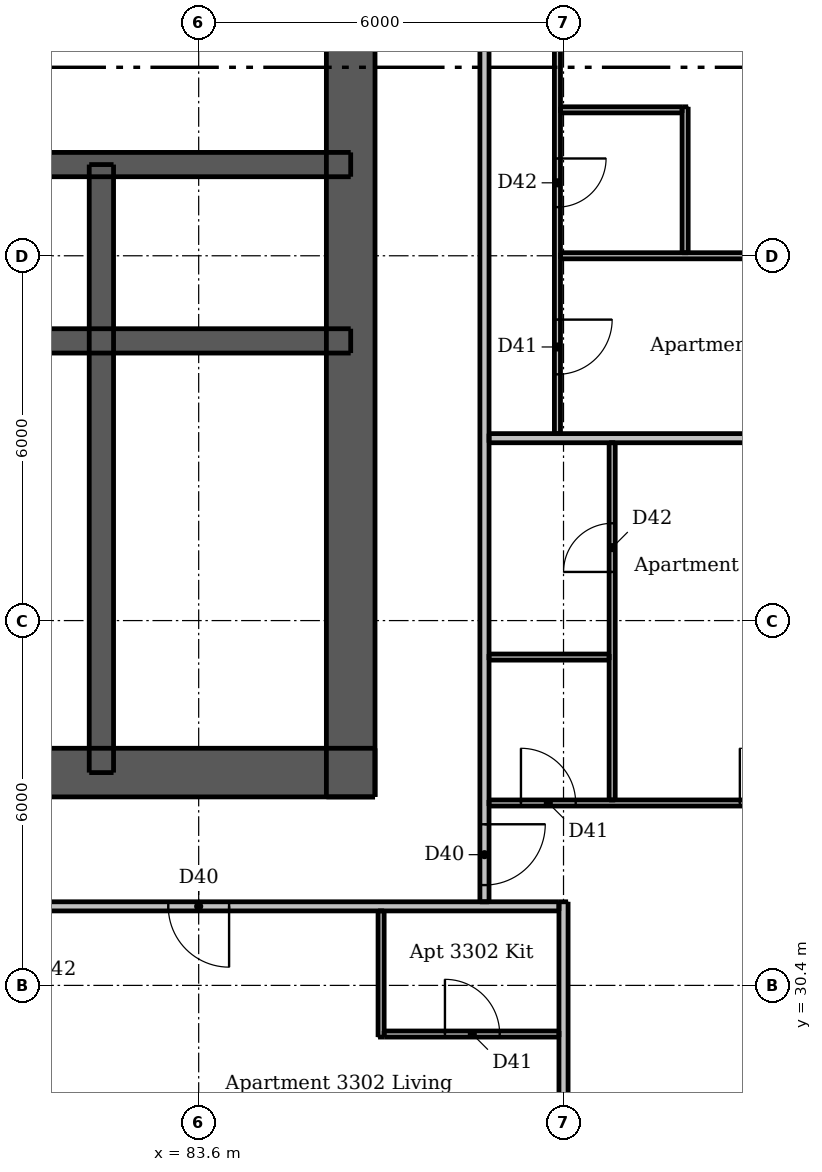
"""IFC4 building model, lengths in metres.
Left out: names, types, materials, properties, quantities, classifications, styles, units other than length and angle.
Written with IfcOpenShell. Run it as: python <this file> out.ifc"""

import sys

from ifc_helpers import new_model, si_unit, direction, frame, frame_2d, origin, place, context, subcontext, project, spatial, rectangle, extrude, element, fill, save


model = new_model("IFC4")
c1 = context("Model", 3, precision=1e-05, world=origin(), true_north=direction((0.0, 1.0)))
c2 = subcontext(c1, "Body", "Model", "MODEL_VIEW")
j1 = project(units=[si_unit("LENGTHUNIT", "METRE"), si_unit("PLANEANGLEUNIT", "RADIAN")], contexts=[c1])
p1 = place(None, origin())
s1 = spatial("IfcSite", under=j1, at=p1, CompositionType="ELEMENT")
p2 = place(p1, origin())
s2 = spatial("IfcBuilding", under=s1, at=p2, CompositionType="ELEMENT")
p3 = place(p2, frame((0.0, 0.0, 121.6)))
s3 = spatial("IfcBuildingStorey", under=s2, at=p3, CompositionType="ELEMENT", Elevation=121.6)
p4 = place(p3, frame((62.5, 33.9, 0.0), z_axis=(0.0, 0.0, 1.0), x_axis=(1.0, 0.0, 0.0)))
e1 = element("IfcWall", 1, at=p4, inside=s3, PredefinedType="SHEAR", context=c2, shape_type="SweptSolid", body=[
    extrude(rectangle(XDim=24.0, YDim=0.8, at=frame_2d((12.0, 0.0))), origin(), (0.0, 0.0, 1.0), 2.95),
])
p5 = place(p4, frame((2.0, 0.0, 0.0)))
e2 = element("IfcOpeningElement", 2, at=p5, cuts=e1, PredefinedType="OPENING", context=c2, shape_type="SweptSolid", body=[
    extrude(rectangle(XDim=1.1, YDim=2.1, at=frame_2d((0.55, 1.05))), frame((0.0, 0.41, 0.0), z_axis=(0.0, -1.0, 0.0), x_axis=(1.0, 0.0, 0.0)), (0.0, 0.0, 1.0), 0.82),
])
p6 = place(p4, frame((20.9, 0.0, 0.0)))
e3 = element("IfcOpeningElement", 3, at=p6, cuts=e1, PredefinedType="OPENING", context=c2, shape_type="SweptSolid", body=[
    extrude(rectangle(XDim=1.1, YDim=2.1, at=frame_2d((0.55, 1.05))), frame((0.0, 0.41, 0.0), z_axis=(0.0, -1.0, 0.0), x_axis=(1.0, 0.0, 0.0)), (0.0, 0.0, 1.0), 0.82),
])
p7 = place(p4, frame((8.0, 0.0, 0.0)))
e4 = element("IfcOpeningElement", 4, at=p7, cuts=e1, PredefinedType="OPENING", context=c2, shape_type="SweptSolid", body=[
    extrude(rectangle(XDim=1.1, YDim=2.1, at=frame_2d((0.55, 1.05))), frame((0.0, 0.41, 0.0), z_axis=(0.0, -1.0, 0.0), x_axis=(1.0, 0.0, 0.0)), (0.0, 0.0, 1.0), 0.82),
])
p8 = place(p4, frame((17.488, 0.0, 0.0)))
e5 = element("IfcOpeningElement", 5, at=p8, cuts=e1, PredefinedType="OPENING", context=c2, shape_type="SweptSolid", body=[
    extrude(rectangle(XDim=0.9, YDim=2.1, at=frame_2d((0.45, 1.05))), frame((0.0, 0.41, 0.0), z_axis=(0.0, -1.0, 0.0), x_axis=(1.0, 0.0, 0.0)), (0.0, 0.0, 1.0), 0.82),
])
p9 = place(p3, frame((86.1, 33.5, 0.0), z_axis=(0.0, 0.0, 1.0), x_axis=(0.0, 1.0, 0.0)))
e6 = element("IfcWall", 6, at=p9, inside=s3, PredefinedType="SHEAR", context=c2, shape_type="SweptSolid", body=[
    extrude(rectangle(XDim=24.0, YDim=0.8, at=frame_2d((12.0, 0.0))), origin(), (0.0, 0.0, 1.0), 2.95),
])
p10 = place(p9, frame((11.2, 0.0, 0.0)))
e7 = element("IfcOpeningElement", 7, at=p10, cuts=e6, PredefinedType="OPENING", context=c2, shape_type="SweptSolid", body=[
    extrude(rectangle(XDim=1.6, YDim=2.1, at=frame_2d((0.8, 1.05))), frame((0.0, 0.41, 0.0), z_axis=(0.0, -1.0, 0.0), x_axis=(1.0, 0.0, 0.0)), (0.0, 0.0, 1.0), 0.82),
])
p11 = place(p3, frame((62.9, 41.0, 0.0), z_axis=(0.0, 0.0, 1.0), x_axis=(1.0, 0.0, 0.0)))
e8 = element("IfcWall", 8, at=p11, inside=s3, PredefinedType="SHEAR", context=c2, shape_type="SweptSolid", body=[
    extrude(rectangle(XDim=23.2, YDim=0.4, at=frame_2d((11.6, 0.0))), origin(), (0.0, 0.0, 1.0), 2.95),
])
p12 = place(p3, frame((62.9, 43.9, 0.0), z_axis=(0.0, 0.0, 1.0), x_axis=(1.0, 0.0, 0.0)))
e9 = element("IfcWall", 9, at=p12, inside=s3, PredefinedType="SHEAR", context=c2, shape_type="SweptSolid", body=[
    extrude(rectangle(XDim=23.2, YDim=0.4, at=frame_2d((11.6, 0.0))), origin(), (0.0, 0.0, 1.0), 2.95),
])
p13 = place(p12, frame((1.7, 0.0, 0.0)))
e10 = element("IfcOpeningElement", 10, at=p13, cuts=e9, PredefinedType="OPENING", context=c2, shape_type="SweptSolid", body=[
    extrude(rectangle(XDim=0.9, YDim=2.1, at=frame_2d((0.45, 1.05))), frame((0.0, 0.21, 0.0), z_axis=(0.0, -1.0, 0.0), x_axis=(1.0, 0.0, 0.0)), (0.0, 0.0, 1.0), 0.42),
])
p14 = place(p12, frame((20.6, 0.0, 0.0)))
e11 = element("IfcOpeningElement", 11, at=p14, cuts=e9, PredefinedType="OPENING", context=c2, shape_type="SweptSolid", body=[
    extrude(rectangle(XDim=0.9, YDim=2.1, at=frame_2d((0.45, 1.05))), frame((0.0, 0.21, 0.0), z_axis=(0.0, -1.0, 0.0), x_axis=(1.0, 0.0, 0.0)), (0.0, 0.0, 1.0), 0.42),
])
p15 = place(p12, frame((4.8, 0.0, 0.0)))
e12 = element("IfcOpeningElement", 12, at=p15, cuts=e9, PredefinedType="OPENING", context=c2, shape_type="SweptSolid", body=[
    extrude(rectangle(XDim=1.1, YDim=2.1, at=frame_2d((0.55, 1.05))), frame((0.0, 0.21, 0.0), z_axis=(0.0, -1.0, 0.0), x_axis=(1.0, 0.0, 0.0)), (0.0, 0.0, 1.0), 0.42),
])
p16 = place(p12, frame((7.3, 0.0, 0.0)))
e13 = element("IfcOpeningElement", 13, at=p16, cuts=e9, PredefinedType="OPENING", context=c2, shape_type="SweptSolid", body=[
    extrude(rectangle(XDim=1.1, YDim=2.1, at=frame_2d((0.55, 1.05))), frame((0.0, 0.21, 0.0), z_axis=(0.0, -1.0, 0.0), x_axis=(1.0, 0.0, 0.0)), (0.0, 0.0, 1.0), 0.42),
])
p17 = place(p12, frame((9.8, 0.0, 0.0)))
e14 = element("IfcOpeningElement", 14, at=p17, cuts=e9, PredefinedType="OPENING", context=c2, shape_type="SweptSolid", body=[
    extrude(rectangle(XDim=1.1, YDim=2.1, at=frame_2d((0.55, 1.05))), frame((0.0, 0.21, 0.0), z_axis=(0.0, -1.0, 0.0), x_axis=(1.0, 0.0, 0.0)), (0.0, 0.0, 1.0), 0.42),
])
p18 = place(p12, frame((12.3, 0.0, 0.0)))
e15 = element("IfcOpeningElement", 15, at=p18, cuts=e9, PredefinedType="OPENING", context=c2, shape_type="SweptSolid", body=[
    extrude(rectangle(XDim=1.1, YDim=2.1, at=frame_2d((0.55, 1.05))), frame((0.0, 0.21, 0.0), z_axis=(0.0, -1.0, 0.0), x_axis=(1.0, 0.0, 0.0)), (0.0, 0.0, 1.0), 0.42),
])
p19 = place(p12, frame((14.8, 0.0, 0.0)))
e16 = element("IfcOpeningElement", 16, at=p19, cuts=e9, PredefinedType="OPENING", context=c2, shape_type="SweptSolid", body=[
    extrude(rectangle(XDim=1.1, YDim=2.1, at=frame_2d((0.55, 1.05))), frame((0.0, 0.21, 0.0), z_axis=(0.0, -1.0, 0.0), x_axis=(1.0, 0.0, 0.0)), (0.0, 0.0, 1.0), 0.42),
])
p20 = place(p12, frame((17.3, 0.0, 0.0)))
e17 = element("IfcOpeningElement", 17, at=p20, cuts=e9, PredefinedType="OPENING", context=c2, shape_type="SweptSolid", body=[
    extrude(rectangle(XDim=1.1, YDim=2.1, at=frame_2d((0.55, 1.05))), frame((0.0, 0.21, 0.0), z_axis=(0.0, -1.0, 0.0), x_axis=(1.0, 0.0, 0.0)), (0.0, 0.0, 1.0), 0.42),
])
p21 = place(p3, frame((82.0, 33.9, 0.0), z_axis=(0.0, 0.0, 1.0), x_axis=(0.0, 1.0, 0.0)))
e18 = element("IfcWall", 18, at=p21, inside=s3, PredefinedType="SHEAR", context=c2, shape_type="SweptSolid", body=[
    extrude(rectangle(XDim=10.0, YDim=0.4, at=frame_2d((5.0, 0.0))), origin(), (0.0, 0.0, 1.0), 2.95),
])
p22 = place(p3, frame((86.6, 29.55, 0.0), z_axis=(0.0, 0.0, 1.0), x_axis=(0.0, 1.0, 0.0)))
e19 = element("IfcWall", 19, at=p22, inside=s3, PredefinedType="PARTITIONING", context=c2, shape_type="SweptSolid", body=[
    extrude(rectangle(XDim=2.075, YDim=0.1, at=frame_2d((1.038, 0.0))), origin(), (0.0, 0.0, 1.0), 2.95),
])
p23 = place(p3, frame((89.5, 54.325, 0.0), z_axis=(0.0, 0.0, 1.0), x_axis=(0.0, -1.0, 0.0)))
e20 = element("IfcWall", 20, at=p23, inside=s3, PredefinedType="PARTITIONING", context=c2, shape_type="SweptSolid", body=[
    extrude(rectangle(XDim=14.85, YDim=0.1, at=frame_2d((7.425, 0.0))), origin(), (0.0, 0.0, 1.0), 2.95),
])
p24 = place(p23, frame((5.775, 0.0, 0.0)))
e21 = element("IfcOpeningElement", 21, at=p24, cuts=e20, PredefinedType="OPENING", context=c2, shape_type="SweptSolid", body=[
    extrude(rectangle(XDim=0.9, YDim=2.1, at=frame_2d((0.45, 1.05))), frame((0.0, 0.06, 0.0), z_axis=(0.0, -1.0, 0.0), x_axis=(1.0, 0.0, 0.0)), (0.0, 0.0, 1.0), 0.12),
])
p25 = place(p23, frame((0.975, 0.0, 0.0)))
e22 = element("IfcOpeningElement", 22, at=p25, cuts=e20, PredefinedType="OPENING", context=c2, shape_type="SweptSolid", body=[
    extrude(rectangle(XDim=0.9, YDim=2.1, at=frame_2d((0.45, 1.05))), frame((0.0, 0.06, 0.0), z_axis=(0.0, -1.0, 0.0), x_axis=(1.0, 0.0, 0.0)), (0.0, 0.0, 1.0), 0.12),
])
p26 = place(p23, frame((12.975, 0.0, 0.0)))
e23 = element("IfcOpeningElement", 23, at=p26, cuts=e20, PredefinedType="OPENING", context=c2, shape_type="SweptSolid", body=[
    extrude(rectangle(XDim=0.9, YDim=2.1, at=frame_2d((0.45, 1.05))), frame((0.0, 0.06, 0.0), z_axis=(0.0, -1.0, 0.0), x_axis=(1.0, 0.0, 0.0)), (0.0, 0.0, 1.0), 0.12),
])
p27 = place(p23, frame((10.325, 0.0, 0.0)))
e24 = element("IfcOpeningElement", 24, at=p27, cuts=e20, PredefinedType="OPENING", context=c2, shape_type="SweptSolid", body=[
    extrude(rectangle(XDim=0.8, YDim=2.1, at=frame_2d((0.4, 1.05))), frame((0.0, 0.06, 0.0), z_axis=(0.0, -1.0, 0.0), x_axis=(1.0, 0.0, 0.0)), (0.0, 0.0, 1.0), 0.12),
])
p28 = place(p3, frame((90.4, 33.45, 0.0), z_axis=(0.0, 0.0, 1.0), x_axis=(0.0, 1.0, 0.0)))
e25 = element("IfcWall", 25, at=p28, inside=s3, PredefinedType="PARTITIONING", context=c2, shape_type="SweptSolid", body=[
    extrude(rectangle(XDim=5.875, YDim=0.1, at=frame_2d((2.938, 0.0))), origin(), (0.0, 0.0, 1.0), 2.95),
])
p29 = place(p28, frame((3.75, 0.0, 0.0)))
e26 = element("IfcOpeningElement", 26, at=p29, cuts=e25, PredefinedType="OPENING", context=c2, shape_type="SweptSolid", body=[
    extrude(rectangle(XDim=0.8, YDim=2.1, at=frame_2d((0.4, 1.05))), frame((0.0, 0.06, 0.0), z_axis=(0.0, -1.0, 0.0), x_axis=(1.0, 0.0, 0.0)), (0.0, 0.0, 1.0), 0.12),
])
p30 = place(p3, frame((91.6, 42.45, 0.0), z_axis=(0.0, 0.0, 1.0), x_axis=(0.0, 1.0, 0.0)))
e27 = element("IfcWall", 27, at=p30, inside=s3, PredefinedType="PARTITIONING", context=c2, shape_type="SweptSolid", body=[
    extrude(rectangle(XDim=2.4, YDim=0.1, at=frame_2d((1.2, 0.0))), origin(), (0.0, 0.0, 1.0), 2.95),
])
p31 = place(p3, frame((89.55, 44.8, 0.0), z_axis=(0.0, 0.0, 1.0), x_axis=(1.0, 0.0, 0.0)))
e28 = element("IfcWall", 28, at=p31, inside=s3, PredefinedType="PARTITIONING", context=c2, shape_type="SweptSolid", body=[
    extrude(rectangle(XDim=2.0, YDim=0.1, at=frame_2d((1.0, 0.0))), origin(), (0.0, 0.0, 1.0), 2.95),
])
p32 = place(p3, frame((89.55, 42.4, 0.0), z_axis=(0.0, 0.0, 1.0), x_axis=(1.0, 0.0, 0.0)))
e29 = element("IfcWall", 29, at=p32, inside=s3, PredefinedType="PARTITIONING", context=c2, shape_type="SweptSolid", body=[
    extrude(rectangle(XDim=7.45, YDim=0.1, at=frame_2d((3.725, 0.0))), origin(), (0.0, 0.0, 1.0), 2.332),
])
p33 = place(p3, frame((88.375, 35.8, 0.0), z_axis=(0.0, 0.0, 1.0), x_axis=(1.0, 0.0, 0.0)))
e30 = element("IfcWall", 30, at=p33, inside=s3, PredefinedType="PARTITIONING", context=c2, shape_type="SweptSolid", body=[
    extrude(rectangle(XDim=1.975, YDim=0.1, at=frame_2d((0.988, 0.0))), origin(), (0.0, 0.0, 1.0), 2.95),
])
p34 = place(p3, frame((88.375, 33.4, 0.0), z_axis=(0.0, 0.0, 1.0), x_axis=(1.0, 0.0, 0.0)))
e31 = element("IfcWall", 31, at=p34, inside=s3, PredefinedType="PARTITIONING", context=c2, shape_type="SweptSolid", body=[
    extrude(rectangle(XDim=7.125, YDim=0.1, at=frame_2d((3.562, 0.0))), origin(), (0.0, 0.0, 1.0), 2.95),
])
p35 = place(p34, frame((0.525, 0.0, 0.0)))
e32 = element("IfcOpeningElement", 32, at=p35, cuts=e31, PredefinedType="OPENING", context=c2, shape_type="SweptSolid", body=[
    extrude(rectangle(XDim=0.9, YDim=2.1, at=frame_2d((0.45, 1.05))), frame((0.0, 0.06, 0.0), z_axis=(0.0, -1.0, 0.0), x_axis=(1.0, 0.0, 0.0)), (0.0, 0.0, 1.0), 0.12),
])
p36 = place(p34, frame((4.125, 0.0, 0.0)))
e33 = element("IfcOpeningElement", 33, at=p36, cuts=e31, PredefinedType="OPENING", context=c2, shape_type="SweptSolid", body=[
    extrude(rectangle(XDim=0.9, YDim=2.1, at=frame_2d((0.45, 1.05))), frame((0.0, 0.06, 0.0), z_axis=(0.0, -1.0, 0.0), x_axis=(1.0, 0.0, 0.0)), (0.0, 0.0, 1.0), 0.12),
])
p37 = place(p3, frame((86.65, 29.6, 0.0), z_axis=(0.0, 0.0, 1.0), x_axis=(1.0, 0.0, 0.0)))
e34 = element("IfcWall", 34, at=p37, inside=s3, PredefinedType="PARTITIONING", context=c2, shape_type="SweptSolid", body=[
    extrude(rectangle(XDim=2.875, YDim=0.1, at=frame_2d((1.438, 0.0))), origin(), (0.0, 0.0, 1.0), 2.95),
])
p38 = place(p37, frame((1.0, 0.0, 0.0)))
e35 = element("IfcOpeningElement", 35, at=p38, cuts=e34, PredefinedType="OPENING", context=c2, shape_type="SweptSolid", body=[
    extrude(rectangle(XDim=0.9, YDim=2.1, at=frame_2d((0.45, 1.05))), frame((0.0, 0.06, 0.0), z_axis=(0.0, -1.0, 0.0), x_axis=(1.0, 0.0, 0.0)), (0.0, 0.0, 1.0), 0.12),
])
p39 = place(p3, frame((88.3, 60.475, 0.0), z_axis=(0.0, 0.0, 1.0), x_axis=(0.0, -1.0, 0.0)))
e36 = element("IfcWall", 36, at=p39, inside=s3, PredefinedType="PARTITIONING", context=c2, shape_type="SweptSolid", body=[
    extrude(rectangle(XDim=28.7, YDim=0.15, at=frame_2d((14.35, 0.0))), origin(), (0.0, 0.0, 1.0), 2.95),
])
p40 = place(p39, frame((27.425, 0.0, 0.0)))
e37 = element("IfcOpeningElement", 37, at=p40, cuts=e36, PredefinedType="OPENING", context=c2, shape_type="SweptSolid", body=[
    extrude(rectangle(XDim=1.0, YDim=2.1, at=frame_2d((0.5, 1.05))), frame((0.0, 0.085, 0.0), z_axis=(0.0, -1.0, 0.0), x_axis=(1.0, 0.0, 0.0)), (0.0, 0.0, 1.0), 0.17),
])
p41 = place(p39, frame((13.075, 0.0, 0.0)))
e38 = element("IfcOpeningElement", 38, at=p41, cuts=e36, PredefinedType="OPENING", context=c2, shape_type="SweptSolid", body=[
    extrude(rectangle(XDim=1.0, YDim=2.1, at=frame_2d((0.5, 1.05))), frame((0.0, 0.085, 0.0), z_axis=(0.0, -1.0, 0.0), x_axis=(1.0, 0.0, 0.0)), (0.0, 0.0, 1.0), 0.17),
])
p42 = place(p39, frame((2.575, 0.0, 0.0)))
e39 = element("IfcOpeningElement", 39, at=p42, cuts=e36, PredefinedType="OPENING", context=c2, shape_type="SweptSolid", body=[
    extrude(rectangle(XDim=1.0, YDim=2.1, at=frame_2d((0.5, 1.05))), frame((0.0, 0.085, 0.0), z_axis=(0.0, -1.0, 0.0), x_axis=(1.0, 0.0, 0.0)), (0.0, 0.0, 1.0), 0.17),
])
p43 = place(p3, frame((89.6, 26.0, 0.0), z_axis=(0.0, 0.0, 1.0), x_axis=(0.0, 1.0, 0.0)))
e40 = element("IfcWall", 40, at=p43, inside=s3, PredefinedType="PARTITIONING", context=c2, shape_type="SweptSolid", body=[
    extrude(rectangle(XDim=5.775, YDim=0.15, at=frame_2d((2.887, 0.0))), origin(), (0.0, 0.0, 1.0), 2.332),
])
p44 = place(p3, frame((88.375, 39.4, 0.0), z_axis=(0.0, 0.0, 1.0), x_axis=(1.0, 0.0, 0.0)))
e41 = element("IfcWall", 41, at=p44, inside=s3, PredefinedType="PARTITIONING", context=c2, shape_type="SweptSolid", body=[
    extrude(rectangle(XDim=8.625, YDim=0.15, at=frame_2d((4.312, 0.0))), origin(), (0.0, 0.0, 1.0), 2.95),
])
p45 = place(p3, frame((89.525, 31.7, 0.0), z_axis=(0.0, 0.0, 1.0), x_axis=(-1.0, 0.0, 0.0)))
e42 = element("IfcWall", 42, at=p45, inside=s3, PredefinedType="PARTITIONING", context=c2, shape_type="SweptSolid", body=[
    extrude(rectangle(XDim=28.75, YDim=0.15, at=frame_2d((14.375, 0.0))), origin(), (0.0, 0.0, 1.0), 2.95),
])
p46 = place(p45, frame((24.625, 0.0, 0.0)))
e43 = element("IfcOpeningElement", 43, at=p46, cuts=e42, PredefinedType="OPENING", context=c2, shape_type="SweptSolid", body=[
    extrude(rectangle(XDim=1.0, YDim=2.1, at=frame_2d((0.5, 1.05))), frame((0.0, 0.085, 0.0), z_axis=(0.0, -1.0, 0.0), x_axis=(1.0, 0.0, 0.0)), (0.0, 0.0, 1.0), 0.17),
])
p47 = place(p45, frame((5.425, 0.0, 0.0)))
e44 = element("IfcOpeningElement", 44, at=p47, cuts=e42, PredefinedType="OPENING", context=c2, shape_type="SweptSolid", body=[
    extrude(rectangle(XDim=1.0, YDim=2.1, at=frame_2d((0.5, 1.05))), frame((0.0, 0.085, 0.0), z_axis=(0.0, -1.0, 0.0), x_axis=(1.0, 0.0, 0.0)), (0.0, 0.0, 1.0), 0.17),
])
p48 = place(p6, origin())
e45 = element("IfcDoor", 45, at=p48, inside=s3, OperationType="SINGLE_SWING_RIGHT", PredefinedType="DOOR", context=c2, shape_type="SweptSolid", body=[
    extrude(rectangle(XDim=1.1, YDim=2.1, at=frame_2d((0.55, 1.05))), frame((0.0, 0.388, 0.0), z_axis=(0.0, -1.0, 0.0), x_axis=(1.0, 0.0, 0.0)), (0.0, 0.0, 1.0), 0.05),
])
fill(e3, e45)
p49 = place(p10, origin())
e46 = element("IfcDoor", 46, at=p49, inside=s3, OperationType="DOUBLE_DOOR_SINGLE_SWING", PredefinedType="DOOR", context=c2, shape_type="SweptSolid", body=[
    extrude(rectangle(XDim=1.6, YDim=2.1, at=frame_2d((0.8, 1.05))), frame((0.0, 0.388, 0.0), z_axis=(0.0, -1.0, 0.0), x_axis=(1.0, 0.0, 0.0)), (0.0, 0.0, 1.0), 0.05),
])
fill(e7, e46)
p50 = place(p14, origin())
e47 = element("IfcDoor", 47, at=p50, inside=s3, OperationType="SINGLE_SWING_LEFT", PredefinedType="DOOR", context=c2, shape_type="SweptSolid", body=[
    extrude(rectangle(XDim=0.9, YDim=2.1, at=frame_2d((0.45, 1.05))), frame((0.0, -0.138, 0.0), z_axis=(0.0, -1.0, 0.0), x_axis=(1.0, 0.0, 0.0)), (0.0, 0.0, 1.0), 0.05),
])
fill(e11, e47)
p51 = place(p20, origin())
e48 = element("IfcDoor", 48, at=p51, inside=s3, OperationType="DOUBLE_DOOR_SLIDING", PredefinedType="DOOR", context=c2, shape_type="SweptSolid", body=[
    extrude(rectangle(XDim=1.1, YDim=2.1, at=frame_2d((0.55, 1.05))), frame((0.0, 0.025, 0.0), z_axis=(0.0, -1.0, 0.0), x_axis=(1.0, 0.0, 0.0)), (0.0, 0.0, 1.0), 0.05),
])
fill(e17, e48)
p52 = place(p47, origin())
e49 = element("IfcDoor", 49, at=p52, inside=s3, OperationType="SINGLE_SWING_LEFT", PredefinedType="DOOR", context=c2, shape_type="SweptSolid", body=[
    extrude(rectangle(XDim=1.0, YDim=2.1, at=frame_2d((0.5, 1.05))), frame((0.0, 0.025, 0.0), z_axis=(0.0, -1.0, 0.0), x_axis=(1.0, 0.0, 0.0)), (0.0, 0.0, 1.0), 0.05),
])
fill(e44, e49)
p53 = place(p38, origin())
e50 = element("IfcDoor", 50, at=p53, inside=s3, OperationType="SINGLE_SWING_LEFT", PredefinedType="DOOR", context=c2, shape_type="SweptSolid", body=[
    extrude(rectangle(XDim=0.9, YDim=2.1, at=frame_2d((0.45, 1.05))), frame((0.0, 0.025, 0.0), z_axis=(0.0, -1.0, 0.0), x_axis=(1.0, 0.0, 0.0)), (0.0, 0.0, 1.0), 0.05),
])
fill(e35, e50)
p54 = place(p40, origin())
e51 = element("IfcDoor", 51, at=p54, inside=s3, OperationType="SINGLE_SWING_LEFT", PredefinedType="DOOR", context=c2, shape_type="SweptSolid", body=[
    extrude(rectangle(XDim=1.0, YDim=2.1, at=frame_2d((0.5, 1.05))), frame((0.0, 0.025, 0.0), z_axis=(0.0, -1.0, 0.0), x_axis=(1.0, 0.0, 0.0)), (0.0, 0.0, 1.0), 0.05),
])
fill(e37, e51)
p55 = place(p35, origin())
e52 = element("IfcDoor", 52, at=p55, inside=s3, OperationType="SINGLE_SWING_LEFT", PredefinedType="DOOR", context=c2, shape_type="SweptSolid", body=[
    extrude(rectangle(XDim=0.9, YDim=2.1, at=frame_2d((0.45, 1.05))), frame((0.0, 0.025, 0.0), z_axis=(0.0, -1.0, 0.0), x_axis=(1.0, 0.0, 0.0)), (0.0, 0.0, 1.0), 0.05),
])
fill(e32, e52)
p56 = place(p36, origin())
e53 = element("IfcDoor", 53, at=p56, inside=s3, OperationType="SINGLE_SWING_LEFT", PredefinedType="DOOR", context=c2, shape_type="SweptSolid", body=[
    extrude(rectangle(XDim=0.9, YDim=2.1, at=frame_2d((0.45, 1.05))), frame((0.0, 0.025, 0.0), z_axis=(0.0, -1.0, 0.0), x_axis=(1.0, 0.0, 0.0)), (0.0, 0.0, 1.0), 0.05),
])
fill(e33, e53)
p57 = place(p29, origin())
e54 = element("IfcDoor", 54, at=p57, inside=s3, OperationType="SINGLE_SWING_LEFT", PredefinedType="DOOR", context=c2, shape_type="SweptSolid", body=[
    extrude(rectangle(XDim=0.8, YDim=2.1, at=frame_2d((0.4, 1.05))), frame((0.0, 0.025, 0.0), z_axis=(0.0, -1.0, 0.0), x_axis=(1.0, 0.0, 0.0)), (0.0, 0.0, 1.0), 0.05),
])
fill(e26, e54)
p58 = place(p26, origin())
e55 = element("IfcDoor", 55, at=p58, inside=s3, OperationType="SINGLE_SWING_LEFT", PredefinedType="DOOR", context=c2, shape_type="SweptSolid", body=[
    extrude(rectangle(XDim=0.9, YDim=2.1, at=frame_2d((0.45, 1.05))), frame((0.0, 0.025, 0.0), z_axis=(0.0, -1.0, 0.0), x_axis=(1.0, 0.0, 0.0)), (0.0, 0.0, 1.0), 0.05),
])
fill(e23, e55)
p59 = place(p27, origin())
e56 = element("IfcDoor", 56, at=p59, inside=s3, OperationType="SINGLE_SWING_LEFT", PredefinedType="DOOR", context=c2, shape_type="SweptSolid", body=[
    extrude(rectangle(XDim=0.8, YDim=2.1, at=frame_2d((0.4, 1.05))), frame((0.0, 0.025, 0.0), z_axis=(0.0, -1.0, 0.0), x_axis=(1.0, 0.0, 0.0)), (0.0, 0.0, 1.0), 0.05),
])
fill(e24, e56)
save(model, sys.argv[1])
